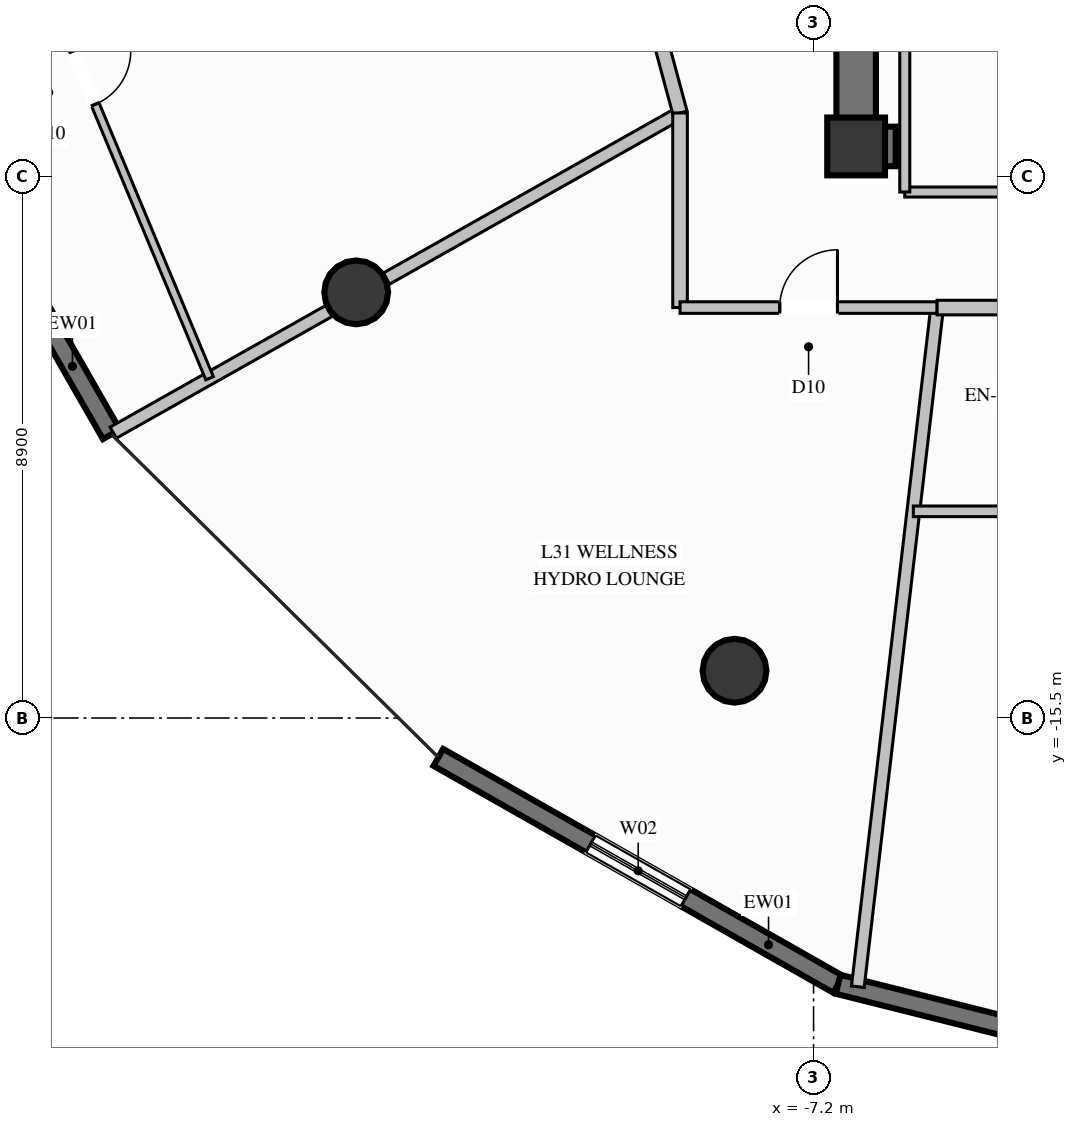
"""IFC4 building model, lengths in metres.
Left out: names, types, materials, properties, quantities, classifications, styles, units other than length and angle.
Written with IfcOpenShell. Run it as: python <this file> out.ifc"""

import sys

from ifc_helpers import new_model, si_unit, direction, frame, frame_2d, origin, origin_2d, place, context, subcontext, project, spatial, rectangle, circle, extrude, element, fill, save


model = new_model("IFC4")
c1 = context("Model", 3, precision=1e-05, world=origin(), true_north=direction((0.0, 1.0)))
c2 = subcontext(c1, "Body", "Model", "MODEL_VIEW")
j1 = project(units=[si_unit("LENGTHUNIT", "METRE"), si_unit("PLANEANGLEUNIT", "RADIAN")], contexts=[c1])
p1 = place(None, origin())
s1 = spatial("IfcSite", under=j1, at=p1, CompositionType="ELEMENT")
p2 = place(p1, origin())
s2 = spatial("IfcBuilding", under=s1, at=p2, CompositionType="ELEMENT")
p3 = place(p2, frame((0.0, 0.0, 124.2)))
s3 = spatial("IfcBuildingStorey", under=s2, at=p3, CompositionType="ELEMENT", Elevation=124.2)
p4 = place(p3, frame((-6.5, -6.1, 0.0), z_axis=(0.0, 0.0, 1.0), x_axis=(1.0, 0.0, 0.0)))
e1 = element("IfcColumn", 1, at=p4, inside=s3, PredefinedType="COLUMN", context=c2, shape_type="SweptSolid", body=[
    extrude(rectangle(XDim=0.95, YDim=0.95, at=origin_2d()), origin(), (0.0, 0.0, 1.0), 3.6),
])
p5 = place(p3, frame((-6.175, -6.1, 0.0), z_axis=(0.0, 0.0, 1.0), x_axis=(1.0, 0.0, 0.0)))
e2 = element("IfcWall", 2, at=p5, inside=s3, PredefinedType="SHEAR", context=c2, shape_type="SweptSolid", body=[
    extrude(rectangle(XDim=0.325, YDim=0.65, at=frame_2d((0.163, 0.0))), origin(), (0.0, 0.0, 1.0), 3.6),
])
p6 = place(p3, frame((-6.5, -6.425, 0.0), z_axis=(0.0, 0.0, 1.0), x_axis=(0.0, 1.0, 0.0)))
e3 = element("IfcWall", 3, at=p6, inside=s3, PredefinedType="SHEAR", context=c2, shape_type="SweptSolid", body=[
    extrude(rectangle(XDim=3.075, YDim=0.65, at=frame_2d((1.538, 0.0))), origin(), (0.0, 0.0, 1.0), 3.6),
])
for number, where, z_axis, x_axis in (
    (4, (-14.722, -8.5, 0.0), (0.0, 0.0, 1.0), (1.0, 0.0, 0.0)),
    (5, (-8.5, -14.722, 0.0), (0.0, 0.0, 1.0), (1.0, 0.0, 0.0)),
):
    element("IfcColumn", number, at=place(p3, frame(where, z_axis=z_axis, x_axis=x_axis)), inside=s3, PredefinedType="COLUMN", context=c2, shape_type="SweptSolid", body=[
        extrude(circle(Radius=0.525, at=origin_2d()), origin(), (0.0, 0.0, 1.0), 3.6),
    ])
p7 = place(p3, frame((-18.748, -10.834, 0.0), z_axis=(0.0, 0.0, 1.0), x_axis=(-0.497401787227, 0.8675202949, 0.0)))
e6 = element("IfcWall", 6, at=p7, inside=s3, PredefinedType="SOLIDWALL", context=c2, shape_type="SweptSolid", body=[
    extrude(rectangle(XDim=7.346, YDim=0.32, at=frame_2d((3.673, 0.0))), origin(), (0.0, 0.0, 1.0), 3.35),
])
p8 = place(p7, frame((2.827, 0.0, 0.35)))
e7 = element("IfcOpeningElement", 7, at=p8, cuts=e6, PredefinedType="OPENING", context=c2, shape_type="SweptSolid", body=[
    extrude(rectangle(XDim=1.8, YDim=2.6, at=frame_2d((0.9, 1.3))), frame((0.0, 0.17, 0.0), z_axis=(0.0, -1.0, 0.0), x_axis=(1.0, 0.0, 0.0)), (0.0, 0.0, 1.0), 0.34),
])
p9 = place(p3, frame((-6.797, -19.879, 0.0), z_axis=(0.0, 0.0, 1.0), x_axis=(-0.869642820433, 0.493681440678, 0.0)))
e8 = element("IfcWall", 8, at=p9, inside=s3, PredefinedType="SOLIDWALL", context=c2, shape_type="SweptSolid", body=[
    extrude(rectangle(XDim=7.559, YDim=0.32, at=frame_2d((3.78, 0.0))), origin(), (0.0, 0.0, 1.0), 3.35),
])
p10 = place(p9, frame((2.88, 0.0, 0.35)))
e9 = element("IfcOpeningElement", 9, at=p10, cuts=e8, PredefinedType="OPENING", context=c2, shape_type="SweptSolid", body=[
    extrude(rectangle(XDim=1.8, YDim=2.6, at=frame_2d((0.9, 1.3))), frame((0.0, 0.17, 0.0), z_axis=(0.0, -1.0, 0.0), x_axis=(1.0, 0.0, 0.0)), (0.0, 0.0, 1.0), 0.34),
])
p11 = place(p3, frame((0.329, -21.665, 0.0), z_axis=(0.0, 0.0, 1.0), x_axis=(-0.969995713118, 0.243122019842, 0.0)))
e10 = element("IfcWall", 10, at=p11, inside=s3, PredefinedType="SOLIDWALL", context=c2, shape_type="SweptSolid", body=[
    extrude(rectangle(XDim=7.347, YDim=0.32, at=frame_2d((3.673, 0.0))), origin(), (0.0, 0.0, 1.0), 3.35),
])
p12 = place(p11, frame((2.561, 0.0, 0.35)))
e11 = element("IfcOpeningElement", 11, at=p12, cuts=e10, PredefinedType="OPENING", context=c2, shape_type="SweptSolid", body=[
    extrude(rectangle(XDim=1.8, YDim=2.6, at=frame_2d((0.9, 1.3))), frame((0.0, 0.17, 0.0), z_axis=(0.0, -1.0, 0.0), x_axis=(1.0, 0.0, 0.0)), (0.0, 0.0, 1.0), 0.34),
])
p13 = place(p3, frame((-5.7, -6.85, 0.0), z_axis=(0.0, 0.0, 1.0), x_axis=(1.0, 0.0, 0.0)))
e12 = element("IfcWall", 12, at=p13, inside=s3, PredefinedType="PARTITIONING", context=c2, shape_type="SweptSolid", body=[
    extrude(rectangle(XDim=4.35, YDim=0.165, at=frame_2d((2.175, 0.0))), origin(), (0.0, 0.0, 1.0), 2.435),
])
p14 = place(p13, frame((1.7, 0.0, 0.0)))
e13 = element("IfcOpeningElement", 13, at=p14, cuts=e12, PredefinedType="OPENING", context=c2, shape_type="SweptSolid", body=[
    extrude(rectangle(XDim=0.95, YDim=2.1, at=frame_2d((0.475, 1.05))), frame((0.0, 0.093, 0.0), z_axis=(0.0, -1.0, 0.0), x_axis=(1.0, 0.0, 0.0)), (0.0, 0.0, 1.0), 0.185),
])
p15 = place(p3, frame((-5.7, -3.5, 0.0), z_axis=(0.0, 0.0, 1.0), x_axis=(0.0, -1.0, 0.0)))
e14 = element("IfcWall", 14, at=p15, inside=s3, PredefinedType="PARTITIONING", context=c2, shape_type="SweptSolid", body=[
    extrude(rectangle(XDim=3.35, YDim=0.165, at=frame_2d((1.675, 0.0))), origin(), (0.0, 0.0, 1.0), 2.435),
])
p16 = place(p3, frame((-9.396, -5.55, 0.0), z_axis=(0.0, 0.0, 1.0), x_axis=(-0.871038847926, -0.491214133962, 0.0)))
e15 = element("IfcWall", 15, at=p16, inside=s3, PredefinedType="PARTITIONING", context=c2, shape_type="SweptSolid", body=[
    extrude(rectangle(XDim=5.545, YDim=0.21, at=frame_2d((2.772, 0.0))), origin(), (0.0, 0.0, 1.0), 2.791),
])
p17 = place(p3, frame((-15.172, -8.807, 0.0), z_axis=(0.0, 0.0, 1.0), x_axis=(-0.871004787506, -0.49127452625, 0.0)))
e16 = element("IfcWall", 16, at=p17, inside=s3, PredefinedType="PARTITIONING", context=c2, shape_type="SweptSolid", body=[
    extrude(rectangle(XDim=4.071, YDim=0.21, at=frame_2d((2.036, 0.0))), origin(), (0.0, 0.0, 1.0), 3.35),
])
p18 = place(p3, frame((-10.85, -0.15, 0.0), z_axis=(0.0, 0.0, 1.0), x_axis=(0.260009481157, -0.965606063417, 0.0)))
e17 = element("IfcWall", 17, at=p18, inside=s3, PredefinedType="PARTITIONING", context=c2, shape_type="SweptSolid", body=[
    extrude(rectangle(XDim=5.593, YDim=0.24, at=frame_2d((2.796, 0.0))), origin(), (0.0, 0.0, 1.0), 3.35),
])
p19 = place(p3, frame((-21.261, -0.026, 0.0), z_axis=(0.0, 0.0, 1.0), x_axis=(0.385272182275, -0.922802983071, 0.0)))
e18 = element("IfcWall", 18, at=p19, inside=s3, PredefinedType="PARTITIONING", context=c2, shape_type="SweptSolid", body=[
    extrude(rectangle(XDim=10.714, YDim=0.135, at=frame_2d((5.357, 0.0))), origin(), (0.0, 0.0, 1.0), 3.35),
])
p20 = place(p19, frame((4.882, 0.0, 0.0)))
e19 = element("IfcOpeningElement", 19, at=p20, cuts=e18, PredefinedType="OPENING", context=c2, shape_type="SweptSolid", body=[
    extrude(rectangle(XDim=0.95, YDim=2.1, at=frame_2d((0.475, 1.05))), frame((0.0, 0.078, 0.0), z_axis=(0.0, -1.0, 0.0), x_axis=(1.0, 0.0, 0.0)), (0.0, 0.0, 1.0), 0.155),
])
p21 = place(p3, frame((-5.168, -8.75, 0.0), z_axis=(0.0, 0.0, 1.0), x_axis=(-0.115960666687, -0.993253806326, 0.0)))
e20 = element("IfcWall", 20, at=p21, inside=s3, PredefinedType="PARTITIONING", context=c2, shape_type="SweptSolid", body=[
    extrude(rectangle(XDim=11.245, YDim=0.21, at=frame_2d((5.623, 0.0))), origin(), (0.0, 0.0, 1.0), 3.35),
])
p22 = place(p3, frame((-9.396, -5.55, 0.0), z_axis=(0.0, 0.0, 1.0), x_axis=(0.0, -1.0, 0.0)))
e21 = element("IfcWall", 21, at=p22, inside=s3, PredefinedType="PARTITIONING", context=c2, shape_type="SweptSolid", body=[
    extrude(rectangle(XDim=3.2, YDim=0.24, at=frame_2d((1.6, 0.0))), origin(), (0.0, 0.0, 1.0), 3.35),
])
p23 = place(p3, frame((-9.396, -8.75, 0.0), z_axis=(0.0, 0.0, 1.0), x_axis=(1.0, 0.0, 0.0)))
e22 = element("IfcWall", 22, at=p23, inside=s3, PredefinedType="PARTITIONING", context=c2, shape_type="SweptSolid", body=[
    extrude(rectangle(XDim=4.228, YDim=0.19, at=frame_2d((2.114, 0.0))), origin(), (0.0, 0.0, 1.0), 3.35),
])
p24 = place(p23, frame((1.639, 0.0, 0.0)))
e23 = element("IfcOpeningElement", 23, at=p24, cuts=e22, PredefinedType="OPENING", context=c2, shape_type="SweptSolid", body=[
    extrude(rectangle(XDim=0.95, YDim=2.1, at=frame_2d((0.475, 1.05))), frame((0.0, 0.105, 0.0), z_axis=(0.0, -1.0, 0.0), x_axis=(1.0, 0.0, 0.0)), (0.0, 0.0, 1.0), 0.21),
])
p25 = place(p3, frame((-5.168, -8.75, 0.0), z_axis=(0.0, 0.0, 1.0), x_axis=(1.0, 0.0, 0.0)))
e24 = element("IfcWall", 24, at=p25, inside=s3, PredefinedType="PARTITIONING", context=c2, shape_type="SweptSolid", body=[
    extrude(rectangle(XDim=5.168, YDim=0.24, at=frame_2d((2.584, 0.0))), origin(), (0.0, 0.0, 1.0), 3.35),
])
p26 = place(p3, frame((-5.559, -12.101, 0.0), z_axis=(0.0, 0.0, 1.0), x_axis=(1.0, 0.0, 0.0)))
e25 = element("IfcWall", 25, at=p26, inside=s3, PredefinedType="PLUMBINGWALL", context=c2, shape_type="SweptSolid", body=[
    extrude(rectangle(XDim=5.559, YDim=0.175, at=frame_2d((2.78, 0.0))), origin(), (0.0, 0.0, 1.0), 2.985),
])
p27 = place(p10, origin())
e26 = element("IfcWindow", 26, at=p27, inside=s3, PartitioningType="SINGLE_PANEL", PredefinedType="WINDOW", context=c2, shape_type="SweptSolid", body=[
    extrude(rectangle(XDim=1.8, YDim=2.6, at=frame_2d((0.9, 1.3))), frame((0.0, 0.03, 0.0), z_axis=(0.0, -1.0, 0.0), x_axis=(1.0, 0.0, 0.0)), (0.0, 0.0, 1.0), 0.06),
])
fill(e9, e26)
p28 = place(p20, origin())
e27 = element("IfcDoor", 27, at=p28, inside=s3, OperationType="SINGLE_SWING_LEFT", PredefinedType="DOOR", context=c2, shape_type="SweptSolid", body=[
    extrude(rectangle(XDim=0.95, YDim=2.1, at=frame_2d((0.475, 1.05))), frame((0.0, 0.025, 0.0), z_axis=(0.0, -1.0, 0.0), x_axis=(1.0, 0.0, 0.0)), (0.0, 0.0, 1.0), 0.05),
])
fill(e19, e27)
p29 = place(p24, origin())
e28 = element("IfcDoor", 28, at=p29, inside=s3, OperationType="SINGLE_SWING_RIGHT", PredefinedType="DOOR", context=c2, shape_type="SweptSolid", body=[
    extrude(rectangle(XDim=0.95, YDim=2.1, at=frame_2d((0.475, 1.05))), frame((0.0, 0.025, 0.0), z_axis=(0.0, -1.0, 0.0), x_axis=(1.0, 0.0, 0.0)), (0.0, 0.0, 1.0), 0.05),
])
fill(e23, e28)
save(model, sys.argv[1])
